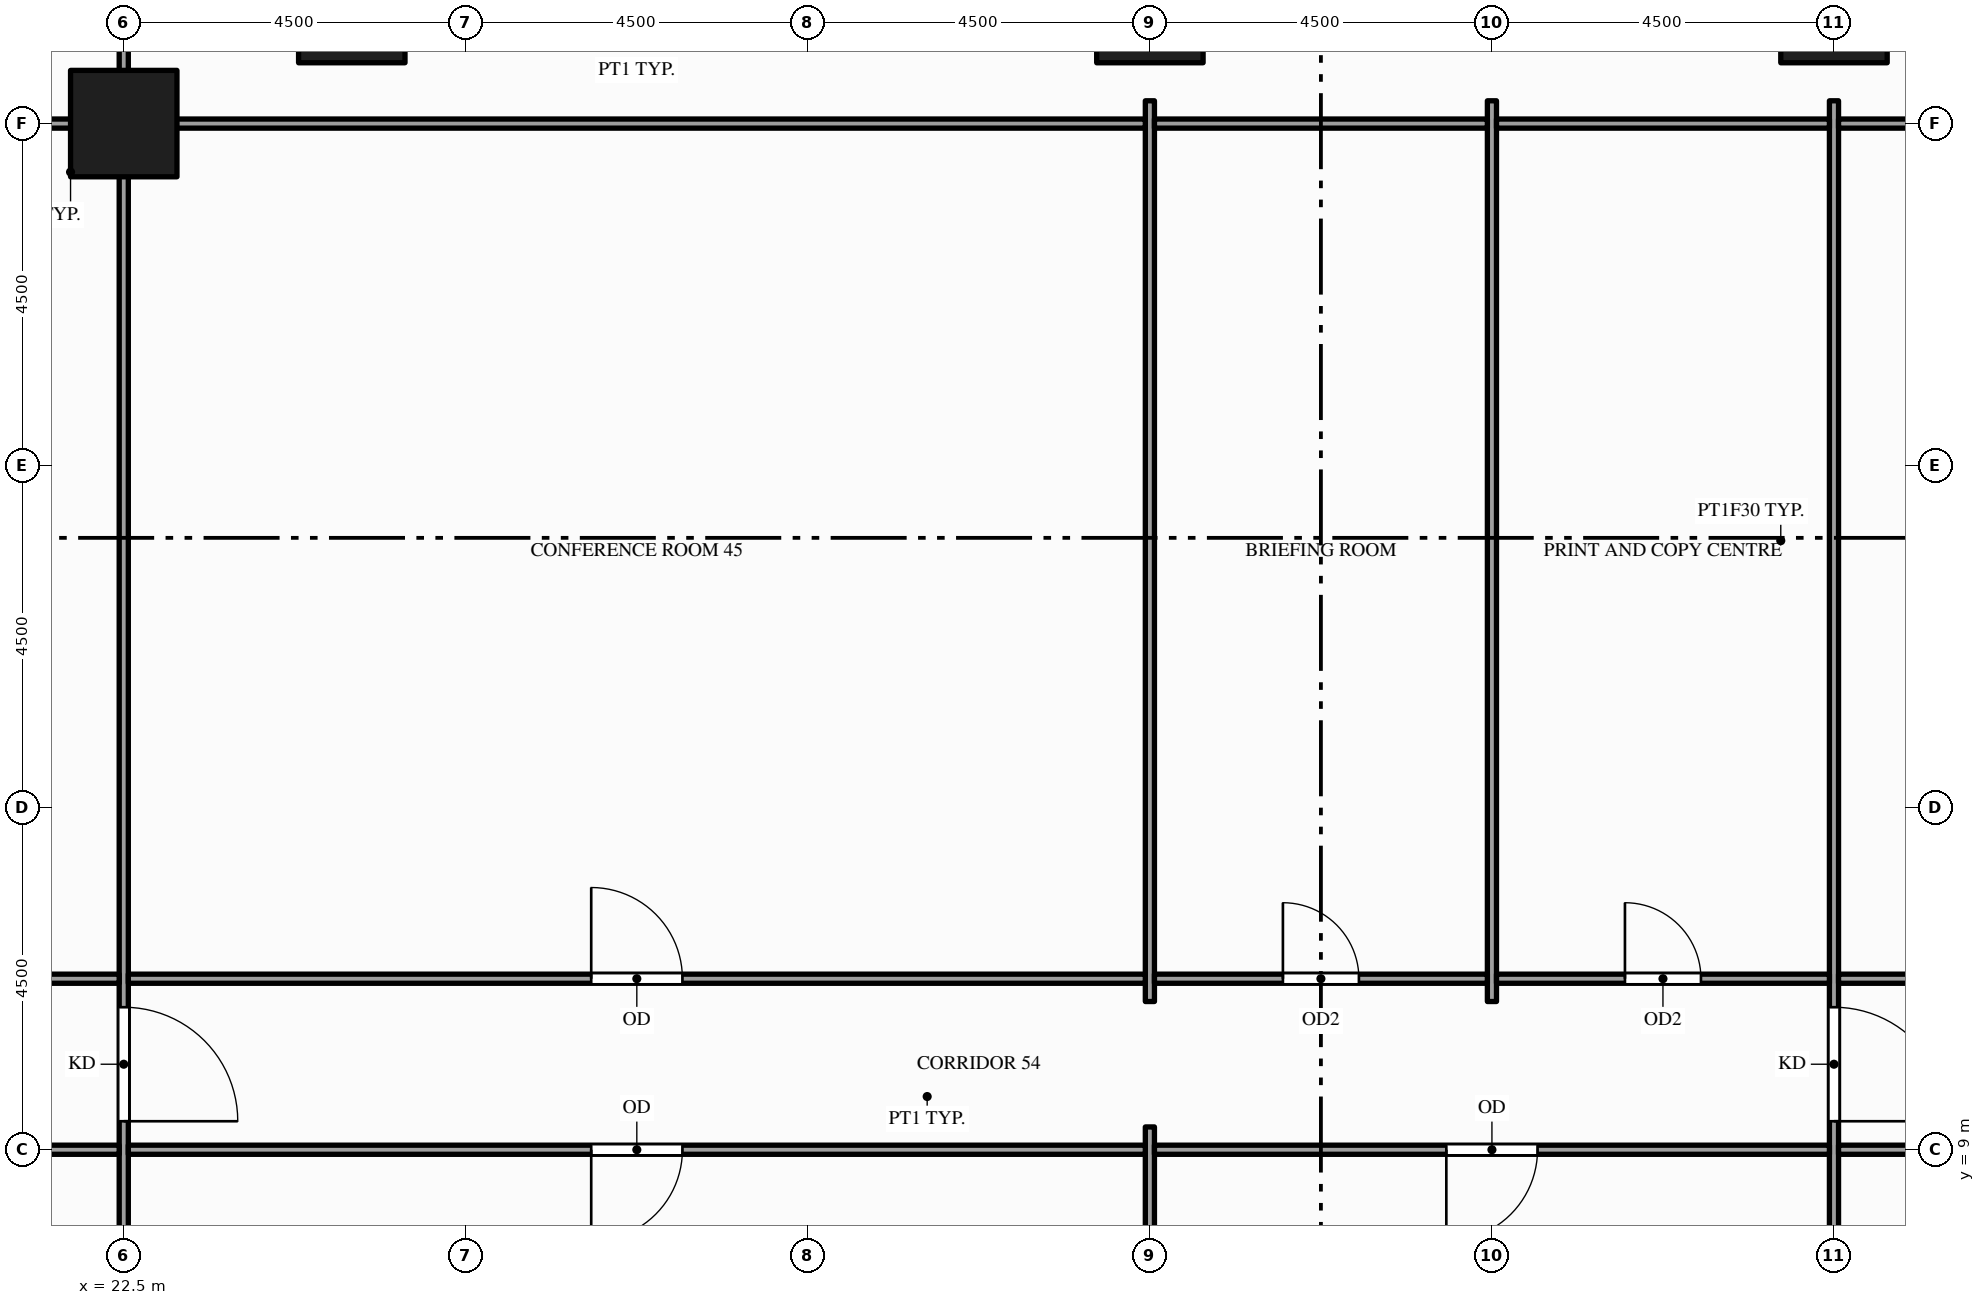
"""IFC4 building model, lengths in metres.
Left out: names, types, materials, properties, quantities, classifications, styles, units other than length and angle.
Written with IfcOpenShell. Run it as: python <this file> out.ifc"""

import sys

from ifc_helpers import new_model, si_unit, direction, frame, frame_2d, origin, origin_2d, place, context, subcontext, project, spatial, rectangle, hollow_rectangle, extrude, element, fill, save


model = new_model("IFC4")
c1 = context("Model", 3, precision=1e-05, world=origin(), true_north=direction((0.0, 1.0)))
c2 = subcontext(c1, "Body", "Model", "MODEL_VIEW")
j1 = project(units=[si_unit("LENGTHUNIT", "METRE"), si_unit("PLANEANGLEUNIT", "RADIAN")], contexts=[c1])
p1 = place(None, origin())
s1 = spatial("IfcSite", under=j1, at=p1, CompositionType="ELEMENT")
p2 = place(p1, origin())
s2 = spatial("IfcBuilding", under=s1, at=p2, CompositionType="ELEMENT")
p3 = place(p2, frame((0.0, 0.0, 19.0)))
s3 = spatial("IfcBuildingStorey", under=s2, at=p3, CompositionType="ELEMENT", Elevation=19.0)
for number, where, z_axis, x_axis in (
    (1, (22.5, 22.5, -0.25), (0.0, 0.0, 1.0), (1.0, 0.0, 0.0)),
    (2, (25.5, 24.0, -0.25), (0.0, 0.0, 1.0), (1.0, 0.0, 0.0)),
    (3, (36.0, 24.0, -0.25), (0.0, 0.0, 1.0), (1.0, 0.0, 0.0)),
    (4, (45.0, 24.0, -0.25), (0.0, 0.0, 1.0), (1.0, 0.0, 0.0)),
):
    element("IfcColumn", number, at=place(p3, frame(where, z_axis=z_axis, x_axis=x_axis)), inside=s3, PredefinedType="COLUMN", context=c2, shape_type="SweptSolid", body=[
        extrude(hollow_rectangle(XDim=1.4, YDim=1.4, WallThickness=0.08, at=origin_2d()), origin(), (0.0, 0.0, 1.0), 5.0),
    ])
p4 = place(p3, frame((22.5, 0.15, 0.0), z_axis=(0.0, 0.0, 1.0), x_axis=(0.0, 1.0, 0.0)))
e5 = element("IfcWall", 5, at=p4, inside=s3, PredefinedType="PARTITIONING", context=c2, shape_type="SweptSolid", body=[
    extrude(rectangle(XDim=35.95, YDim=0.12, at=frame_2d((17.975, 0.0))), origin(), (0.0, 0.0, 1.0), 3.759),
])
p5 = place(p4, frame((9.225, 0.0, 0.0)))
e6 = element("IfcOpeningElement", 6, at=p5, cuts=e5, PredefinedType="OPENING", context=c2, shape_type="SweptSolid", body=[
    extrude(rectangle(XDim=1.5, YDim=2.1, at=frame_2d((0.75, 1.05))), frame((0.0, 0.07, 0.0), z_axis=(0.0, -1.0, 0.0), x_axis=(1.0, 0.0, 0.0)), (0.0, 0.0, 1.0), 0.14),
])
p6 = place(p4, frame((32.7, 0.0, 0.0)))
e7 = element("IfcOpeningElement", 7, at=p6, cuts=e5, PredefinedType="OPENING", context=c2, shape_type="SweptSolid", body=[
    extrude(rectangle(XDim=1.8, YDim=2.1, at=frame_2d((0.9, 1.05))), frame((0.0, 0.07, 0.0), z_axis=(0.0, -1.0, 0.0), x_axis=(1.0, 0.0, 0.0)), (0.0, 0.0, 1.0), 0.14),
])
p7 = place(p3, frame((36.0, 0.15, 0.0), z_axis=(0.0, 0.0, 1.0), x_axis=(0.0, 1.0, 0.0)))
e8 = element("IfcWall", 8, at=p7, inside=s3, PredefinedType="PARTITIONING", context=c2, shape_type="SweptSolid", body=[
    extrude(rectangle(XDim=9.15, YDim=0.12, at=frame_2d((4.575, 0.0))), origin(), (0.0, 0.0, 1.0), 3.759),
])
for number, where, z_axis, x_axis in (
    (9, (36.0, 10.95, 0.0), (0.0, 0.0, 1.0), (0.0, 1.0, 0.0)),
    (10, (40.5, 10.95, 0.0), (0.0, 0.0, 1.0), (0.0, 1.0, 0.0)),
):
    element("IfcWall", number, at=place(p3, frame(where, z_axis=z_axis, x_axis=x_axis)), inside=s3, PredefinedType="PARTITIONING", context=c2, shape_type="SweptSolid", body=[
        extrude(rectangle(XDim=11.85, YDim=0.12, at=frame_2d((5.925, 0.0))), origin(), (0.0, 0.0, 1.0), 3.759),
    ])
p8 = place(p3, frame((45.0, 0.15, 0.0), z_axis=(0.0, 0.0, 1.0), x_axis=(0.0, 1.0, 0.0)))
e11 = element("IfcWall", 11, at=p8, inside=s3, PredefinedType="PARTITIONING", context=c2, shape_type="SweptSolid", body=[
    extrude(rectangle(XDim=22.65, YDim=0.12, at=frame_2d((11.325, 0.0))), origin(), (0.0, 0.0, 1.0), 3.759),
])
p9 = place(p8, frame((9.225, 0.0, 0.0)))
e12 = element("IfcOpeningElement", 12, at=p9, cuts=e11, PredefinedType="OPENING", context=c2, shape_type="SweptSolid", body=[
    extrude(rectangle(XDim=1.5, YDim=2.1, at=frame_2d((0.75, 1.05))), frame((0.0, 0.07, 0.0), z_axis=(0.0, -1.0, 0.0), x_axis=(1.0, 0.0, 0.0)), (0.0, 0.0, 1.0), 0.14),
])
p10 = place(p3, frame((15.81, 9.0, 0.0), z_axis=(0.0, 0.0, 1.0), x_axis=(1.0, 0.0, 0.0)))
e13 = element("IfcWall", 13, at=p10, inside=s3, PredefinedType="PARTITIONING", context=c2, shape_type="SweptSolid", body=[
    extrude(rectangle(XDim=6.63, YDim=0.12, at=frame_2d((3.315, 0.0))), origin(), (0.0, 0.0, 1.0), 3.759),
])
p11 = place(p10, frame((2.815, 0.0, 0.0)))
e14 = element("IfcOpeningElement", 14, at=p11, cuts=e13, PredefinedType="OPENING", context=c2, shape_type="SweptSolid", body=[
    extrude(rectangle(XDim=1.0, YDim=2.1, at=frame_2d((0.5, 1.05))), frame((0.0, 0.07, 0.0), z_axis=(0.0, -1.0, 0.0), x_axis=(1.0, 0.0, 0.0)), (0.0, 0.0, 1.0), 0.14),
])
p12 = place(p3, frame((22.56, 9.0, 0.0), z_axis=(0.0, 0.0, 1.0), x_axis=(1.0, 0.0, 0.0)))
e15 = element("IfcWall", 15, at=p12, inside=s3, PredefinedType="PARTITIONING", context=c2, shape_type="SweptSolid", body=[
    extrude(rectangle(XDim=13.38, YDim=0.12, at=frame_2d((6.69, 0.0))), origin(), (0.0, 0.0, 1.0), 3.66),
])
p13 = place(p12, frame((6.09, 0.0, 0.0)))
e16 = element("IfcOpeningElement", 16, at=p13, cuts=e15, PredefinedType="OPENING", context=c2, shape_type="SweptSolid", body=[
    extrude(rectangle(XDim=1.2, YDim=2.1, at=frame_2d((0.6, 1.05))), frame((0.0, 0.07, 0.0), z_axis=(0.0, -1.0, 0.0), x_axis=(1.0, 0.0, 0.0)), (0.0, 0.0, 1.0), 0.14),
])
p14 = place(p3, frame((36.06, 9.0, 0.0), z_axis=(0.0, 0.0, 1.0), x_axis=(1.0, 0.0, 0.0)))
e17 = element("IfcWall", 17, at=p14, inside=s3, PredefinedType="PARTITIONING", context=c2, shape_type="SweptSolid", body=[
    extrude(rectangle(XDim=8.88, YDim=0.12, at=frame_2d((4.44, 0.0))), origin(), (0.0, 0.0, 1.0), 3.66),
])
p15 = place(p14, frame((3.84, 0.0, 0.0)))
e18 = element("IfcOpeningElement", 18, at=p15, cuts=e17, PredefinedType="OPENING", context=c2, shape_type="SweptSolid", body=[
    extrude(rectangle(XDim=1.2, YDim=2.1, at=frame_2d((0.6, 1.05))), frame((0.0, 0.07, 0.0), z_axis=(0.0, -1.0, 0.0), x_axis=(1.0, 0.0, 0.0)), (0.0, 0.0, 1.0), 0.14),
])
p16 = place(p3, frame((45.06, 9.0, 0.0), z_axis=(0.0, 0.0, 1.0), x_axis=(1.0, 0.0, 0.0)))
e19 = element("IfcWall", 19, at=p16, inside=s3, PredefinedType="PARTITIONING", context=c2, shape_type="SweptSolid", body=[
    extrude(rectangle(XDim=4.38, YDim=0.12, at=frame_2d((2.19, 0.0))), origin(), (0.0, 0.0, 1.0), 3.66),
])
p17 = place(p3, frame((11.31, 11.25, 0.0), z_axis=(0.0, 0.0, 1.0), x_axis=(1.0, 0.0, 0.0)))
e20 = element("IfcWall", 20, at=p17, inside=s3, PredefinedType="PARTITIONING", context=c2, shape_type="SweptSolid", body=[
    extrude(rectangle(XDim=11.13, YDim=0.12, at=frame_2d((5.565, 0.0))), origin(), (0.0, 0.0, 1.0), 3.759),
])
p18 = place(p3, frame((22.56, 11.25, 0.0), z_axis=(0.0, 0.0, 1.0), x_axis=(1.0, 0.0, 0.0)))
e21 = element("IfcWall", 21, at=p18, inside=s3, PredefinedType="PARTITIONING", context=c2, shape_type="SweptSolid", body=[
    extrude(rectangle(XDim=13.38, YDim=0.12, at=frame_2d((6.69, 0.0))), origin(), (0.0, 0.0, 1.0), 3.66),
])
p19 = place(p18, frame((6.09, 0.0, 0.0)))
e22 = element("IfcOpeningElement", 22, at=p19, cuts=e21, PredefinedType="OPENING", context=c2, shape_type="SweptSolid", body=[
    extrude(rectangle(XDim=1.2, YDim=2.1, at=frame_2d((0.6, 1.05))), frame((0.0, 0.07, 0.0), z_axis=(0.0, -1.0, 0.0), x_axis=(1.0, 0.0, 0.0)), (0.0, 0.0, 1.0), 0.14),
])
p20 = place(p3, frame((36.06, 11.25, 0.0), z_axis=(0.0, 0.0, 1.0), x_axis=(1.0, 0.0, 0.0)))
e23 = element("IfcWall", 23, at=p20, inside=s3, PredefinedType="PARTITIONING", context=c2, shape_type="SweptSolid", body=[
    extrude(rectangle(XDim=4.38, YDim=0.12, at=frame_2d((2.19, 0.0))), origin(), (0.0, 0.0, 1.0), 3.66),
])
p21 = place(p20, frame((1.69, 0.0, 0.0)))
e24 = element("IfcOpeningElement", 24, at=p21, cuts=e23, PredefinedType="OPENING", context=c2, shape_type="SweptSolid", body=[
    extrude(rectangle(XDim=1.0, YDim=2.1, at=frame_2d((0.5, 1.05))), frame((0.0, 0.07, 0.0), z_axis=(0.0, -1.0, 0.0), x_axis=(1.0, 0.0, 0.0)), (0.0, 0.0, 1.0), 0.14),
])
p22 = place(p3, frame((40.56, 11.25, 0.0), z_axis=(0.0, 0.0, 1.0), x_axis=(1.0, 0.0, 0.0)))
e25 = element("IfcWall", 25, at=p22, inside=s3, PredefinedType="PARTITIONING", context=c2, shape_type="SweptSolid", body=[
    extrude(rectangle(XDim=4.38, YDim=0.12, at=frame_2d((2.19, 0.0))), origin(), (0.0, 0.0, 1.0), 3.66),
])
p23 = place(p22, frame((1.69, 0.0, 0.0)))
e26 = element("IfcOpeningElement", 26, at=p23, cuts=e25, PredefinedType="OPENING", context=c2, shape_type="SweptSolid", body=[
    extrude(rectangle(XDim=1.0, YDim=2.1, at=frame_2d((0.5, 1.05))), frame((0.0, 0.07, 0.0), z_axis=(0.0, -1.0, 0.0), x_axis=(1.0, 0.0, 0.0)), (0.0, 0.0, 1.0), 0.14),
])
p24 = place(p3, frame((45.06, 11.25, 0.0), z_axis=(0.0, 0.0, 1.0), x_axis=(1.0, 0.0, 0.0)))
e27 = element("IfcWall", 27, at=p24, inside=s3, PredefinedType="PARTITIONING", context=c2, shape_type="SweptSolid", body=[
    extrude(rectangle(XDim=4.38, YDim=0.12, at=frame_2d((2.19, 0.0))), origin(), (0.0, 0.0, 1.0), 3.66),
])
p25 = place(p3, frame((11.31, 22.5, 0.0), z_axis=(0.0, 0.0, 1.0), x_axis=(1.0, 0.0, 0.0)))
e28 = element("IfcWall", 28, at=p25, inside=s3, PredefinedType="PARTITIONING", context=c2, shape_type="SweptSolid", body=[
    extrude(rectangle(XDim=11.13, YDim=0.12, at=frame_2d((5.565, 0.0))), origin(), (0.0, 0.0, 1.0), 3.5),
])
p26 = place(p3, frame((22.56, 22.5, 0.0), z_axis=(0.0, 0.0, 1.0), x_axis=(1.0, 0.0, 0.0)))
e29 = element("IfcWall", 29, at=p26, inside=s3, PredefinedType="PARTITIONING", context=c2, shape_type="SweptSolid", body=[
    extrude(rectangle(XDim=13.38, YDim=0.12, at=frame_2d((6.69, 0.0))), origin(), (0.0, 0.0, 1.0), 3.66),
])
for number, where, z_axis, x_axis in (
    (30, (36.06, 22.5, 0.0), (0.0, 0.0, 1.0), (1.0, 0.0, 0.0)),
    (31, (40.56, 22.5, 0.0), (0.0, 0.0, 1.0), (1.0, 0.0, 0.0)),
    (32, (45.06, 22.5, 0.0), (0.0, 0.0, 1.0), (1.0, 0.0, 0.0)),
):
    element("IfcWall", number, at=place(p3, frame(where, z_axis=z_axis, x_axis=x_axis)), inside=s3, PredefinedType="PARTITIONING", context=c2, shape_type="SweptSolid", body=[
        extrude(rectangle(XDim=4.38, YDim=0.12, at=frame_2d((2.19, 0.0))), origin(), (0.0, 0.0, 1.0), 3.66),
    ])
p27 = place(p9, origin())
e33 = element("IfcDoor", 33, at=p27, inside=s3, OperationType="SINGLE_SWING_LEFT", PredefinedType="DOOR", context=c2, shape_type="SweptSolid", body=[
    extrude(rectangle(XDim=1.5, YDim=2.1, at=frame_2d((0.75, 1.05))), frame((0.0, 0.025, 0.0), z_axis=(0.0, -1.0, 0.0), x_axis=(1.0, 0.0, 0.0)), (0.0, 0.0, 1.0), 0.05),
])
fill(e12, e33)
p28 = place(p13, origin())
e34 = element("IfcDoor", 34, at=p28, inside=s3, OperationType="SINGLE_SWING_LEFT", PredefinedType="DOOR", context=c2, shape_type="SweptSolid", body=[
    extrude(rectangle(XDim=1.2, YDim=2.1, at=frame_2d((0.6, 1.05))), frame((0.0, 0.025, 0.0), z_axis=(0.0, -1.0, 0.0), x_axis=(1.0, 0.0, 0.0)), (0.0, 0.0, 1.0), 0.05),
])
fill(e16, e34)
p29 = place(p15, origin())
e35 = element("IfcDoor", 35, at=p29, inside=s3, OperationType="SINGLE_SWING_LEFT", PredefinedType="DOOR", context=c2, shape_type="SweptSolid", body=[
    extrude(rectangle(XDim=1.2, YDim=2.1, at=frame_2d((0.6, 1.05))), frame((0.0, 0.025, 0.0), z_axis=(0.0, -1.0, 0.0), x_axis=(1.0, 0.0, 0.0)), (0.0, 0.0, 1.0), 0.05),
])
fill(e18, e35)
p30 = place(p19, origin())
e36 = element("IfcDoor", 36, at=p30, inside=s3, OperationType="SINGLE_SWING_LEFT", PredefinedType="DOOR", context=c2, shape_type="SweptSolid", body=[
    extrude(rectangle(XDim=1.2, YDim=2.1, at=frame_2d((0.6, 1.05))), frame((0.0, 0.025, 0.0), z_axis=(0.0, -1.0, 0.0), x_axis=(1.0, 0.0, 0.0)), (0.0, 0.0, 1.0), 0.05),
])
fill(e22, e36)
p31 = place(p21, origin())
e37 = element("IfcDoor", 37, at=p31, inside=s3, OperationType="SINGLE_SWING_LEFT", PredefinedType="DOOR", context=c2, shape_type="SweptSolid", body=[
    extrude(rectangle(XDim=1.0, YDim=2.1, at=frame_2d((0.5, 1.05))), frame((0.0, 0.025, 0.0), z_axis=(0.0, -1.0, 0.0), x_axis=(1.0, 0.0, 0.0)), (0.0, 0.0, 1.0), 0.05),
])
fill(e24, e37)
p32 = place(p23, origin())
e38 = element("IfcDoor", 38, at=p32, inside=s3, OperationType="SINGLE_SWING_LEFT", PredefinedType="DOOR", context=c2, shape_type="SweptSolid", body=[
    extrude(rectangle(XDim=1.0, YDim=2.1, at=frame_2d((0.5, 1.05))), frame((0.0, 0.025, 0.0), z_axis=(0.0, -1.0, 0.0), x_axis=(1.0, 0.0, 0.0)), (0.0, 0.0, 1.0), 0.05),
])
fill(e26, e38)
p33 = place(p5, origin())
e39 = element("IfcDoor", 39, at=p33, inside=s3, OperationType="SINGLE_SWING_LEFT", PredefinedType="DOOR", context=c2, shape_type="SweptSolid", body=[
    extrude(rectangle(XDim=1.5, YDim=2.1, at=frame_2d((0.75, 1.05))), frame((0.0, 0.025, 0.0), z_axis=(0.0, -1.0, 0.0), x_axis=(1.0, 0.0, 0.0)), (0.0, 0.0, 1.0), 0.05),
])
fill(e6, e39)
save(model, sys.argv[1])
